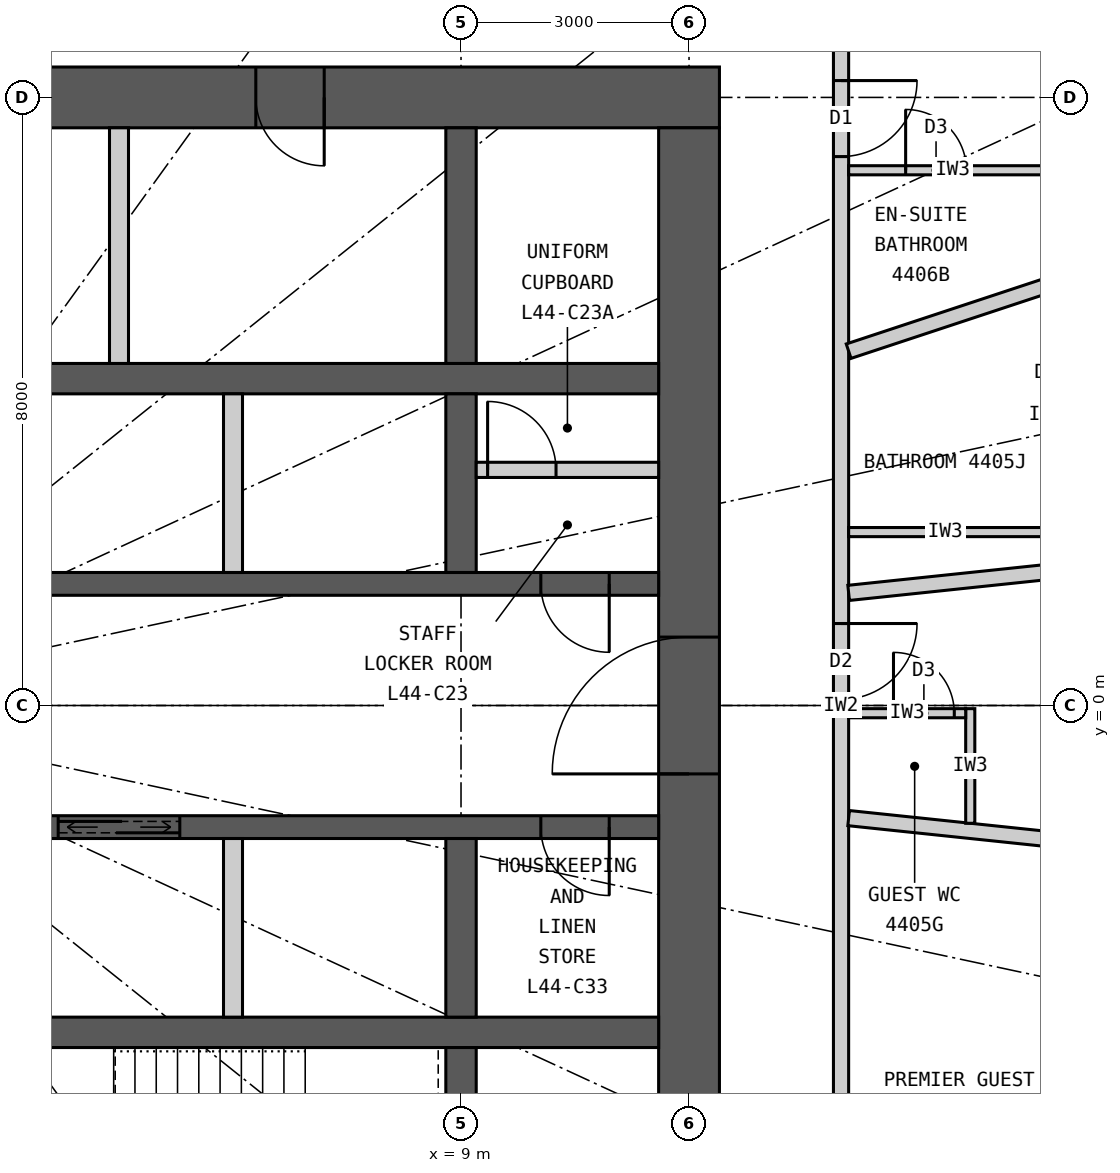
"""IFC4 building model, lengths in metres.
Left out: names, types, materials, properties, quantities, classifications, styles, units other than length and angle.
Written with IfcOpenShell. Run it as: python <this file> out.ifc"""

import sys

from ifc_helpers import new_model, si_unit, direction, frame, frame_2d, origin, place, context, subcontext, project, spatial, rectangle, extrude, element, fill, save


model = new_model("IFC4")
c1 = context("Model", 3, precision=1e-05, world=origin(), true_north=direction((0.0, 1.0)))
c2 = subcontext(c1, "Body", "Model", "MODEL_VIEW")
j1 = project(units=[si_unit("LENGTHUNIT", "METRE"), si_unit("PLANEANGLEUNIT", "RADIAN")], contexts=[c1])
p1 = place(None, origin())
s1 = spatial("IfcSite", under=j1, at=p1, CompositionType="ELEMENT")
p2 = place(p1, origin())
s2 = spatial("IfcBuilding", under=s1, at=p2, CompositionType="ELEMENT")
p3 = place(p2, frame((0.0, 0.0, 166.5)))
s3 = spatial("IfcBuildingStorey", under=s2, at=p3, CompositionType="ELEMENT", Elevation=166.5)
p4 = place(p3, frame((-12.4, 8.0, 0.0), z_axis=(0.0, 0.0, 1.0), x_axis=(1.0, 0.0, 0.0)))
e1 = element("IfcWall", 1, at=p4, inside=s3, PredefinedType="SHEAR", context=c2, shape_type="SweptSolid", body=[
    extrude(rectangle(XDim=24.8, YDim=0.8, at=frame_2d((12.4, 0.0))), origin(), (0.0, 0.0, 1.0), 3.3),
])
p5 = place(p4, frame((11.1, 0.0, 0.0)))
e2 = element("IfcOpeningElement", 2, at=p5, cuts=e1, PredefinedType="OPENING", context=c2, shape_type="SweptSolid", body=[
    extrude(rectangle(XDim=1.2, YDim=2.2, at=frame_2d((0.6, 1.1))), frame((0.0, 0.41, 0.0), z_axis=(0.0, -1.0, 0.0), x_axis=(1.0, 0.0, 0.0)), (0.0, 0.0, 1.0), 0.82),
])
p6 = place(p4, frame((18.7, 0.0, 0.0)))
e3 = element("IfcOpeningElement", 3, at=p6, cuts=e1, PredefinedType="OPENING", context=c2, shape_type="SweptSolid", body=[
    extrude(rectangle(XDim=0.9, YDim=2.2, at=frame_2d((0.45, 1.1))), frame((0.0, 0.41, 0.0), z_axis=(0.0, -1.0, 0.0), x_axis=(1.0, 0.0, 0.0)), (0.0, 0.0, 1.0), 0.82),
])
p7 = place(p3, frame((12.0, -7.6, 0.0), z_axis=(0.0, 0.0, 1.0), x_axis=(0.0, 1.0, 0.0)))
e4 = element("IfcWall", 4, at=p7, inside=s3, PredefinedType="SHEAR", context=c2, shape_type="SweptSolid", body=[
    extrude(rectangle(XDim=15.2, YDim=0.8, at=frame_2d((7.6, 0.0))), origin(), (0.0, 0.0, 1.0), 3.3),
])
p8 = place(p7, frame((6.7, 0.0, 0.0)))
e5 = element("IfcOpeningElement", 5, at=p8, cuts=e4, PredefinedType="OPENING", context=c2, shape_type="SweptSolid", body=[
    extrude(rectangle(XDim=1.8, YDim=2.2, at=frame_2d((0.9, 1.1))), frame((0.0, 0.41, 0.0), z_axis=(0.0, -1.0, 0.0), x_axis=(1.0, 0.0, 0.0)), (0.0, 0.0, 1.0), 0.82),
])
p9 = place(p3, frame((-11.6, 4.3, 0.0), z_axis=(0.0, 0.0, 1.0), x_axis=(1.0, 0.0, 0.0)))
e6 = element("IfcWall", 6, at=p9, inside=s3, PredefinedType="SHEAR", context=c2, shape_type="SweptSolid", body=[
    extrude(rectangle(XDim=23.2, YDim=0.4, at=frame_2d((11.6, 0.0))), origin(), (0.0, 0.0, 1.0), 3.3),
])
p10 = place(p3, frame((-11.6, 1.6, 0.0), z_axis=(0.0, 0.0, 1.0), x_axis=(1.0, 0.0, 0.0)))
e7 = element("IfcWall", 7, at=p10, inside=s3, PredefinedType="SHEAR", context=c2, shape_type="SweptSolid", body=[
    extrude(rectangle(XDim=23.2, YDim=0.3, at=frame_2d((11.6, 0.0))), origin(), (0.0, 0.0, 1.0), 3.3),
])
p11 = place(p10, frame((9.55, 0.0, 0.0)))
e8 = element("IfcOpeningElement", 8, at=p11, cuts=e7, PredefinedType="OPENING", context=c2, shape_type="SweptSolid", body=[
    extrude(rectangle(XDim=1.1, YDim=2.2, at=frame_2d((0.55, 1.1))), frame((0.0, 0.16, 0.0), z_axis=(0.0, -1.0, 0.0), x_axis=(1.0, 0.0, 0.0)), (0.0, 0.0, 1.0), 0.32),
])
p12 = place(p10, frame((12.55, 0.0, 0.0)))
e9 = element("IfcOpeningElement", 9, at=p12, cuts=e7, PredefinedType="OPENING", context=c2, shape_type="SweptSolid", body=[
    extrude(rectangle(XDim=1.1, YDim=2.2, at=frame_2d((0.55, 1.1))), frame((0.0, 0.16, 0.0), z_axis=(0.0, -1.0, 0.0), x_axis=(1.0, 0.0, 0.0)), (0.0, 0.0, 1.0), 0.32),
])
p13 = place(p10, frame((0.65, 0.0, 0.0)))
e10 = element("IfcOpeningElement", 10, at=p13, cuts=e7, PredefinedType="OPENING", context=c2, shape_type="SweptSolid", body=[
    extrude(rectangle(XDim=0.9, YDim=2.2, at=frame_2d((0.45, 1.1))), frame((0.0, 0.16, 0.0), z_axis=(0.0, -1.0, 0.0), x_axis=(1.0, 0.0, 0.0)), (0.0, 0.0, 1.0), 0.32),
])
p14 = place(p10, frame((5.15, 0.0, 0.0)))
e11 = element("IfcOpeningElement", 11, at=p14, cuts=e7, PredefinedType="OPENING", context=c2, shape_type="SweptSolid", body=[
    extrude(rectangle(XDim=0.9, YDim=2.2, at=frame_2d((0.45, 1.1))), frame((0.0, 0.16, 0.0), z_axis=(0.0, -1.0, 0.0), x_axis=(1.0, 0.0, 0.0)), (0.0, 0.0, 1.0), 0.32),
])
p15 = place(p10, frame((21.65, 0.0, 0.0)))
e12 = element("IfcOpeningElement", 12, at=p15, cuts=e7, PredefinedType="OPENING", context=c2, shape_type="SweptSolid", body=[
    extrude(rectangle(XDim=0.9, YDim=2.2, at=frame_2d((0.45, 1.1))), frame((0.0, 0.16, 0.0), z_axis=(0.0, -1.0, 0.0), x_axis=(1.0, 0.0, 0.0)), (0.0, 0.0, 1.0), 0.32),
])
p16 = place(p3, frame((-11.6, -4.3, 0.0), z_axis=(0.0, 0.0, 1.0), x_axis=(1.0, 0.0, 0.0)))
e13 = element("IfcWall", 13, at=p16, inside=s3, PredefinedType="SHEAR", context=c2, shape_type="SweptSolid", body=[
    extrude(rectangle(XDim=23.2, YDim=0.4, at=frame_2d((11.6, 0.0))), origin(), (0.0, 0.0, 1.0), 3.3),
])
p17 = place(p3, frame((-11.6, -1.6, 0.0), z_axis=(0.0, 0.0, 1.0), x_axis=(1.0, 0.0, 0.0)))
e14 = element("IfcWall", 14, at=p17, inside=s3, PredefinedType="SHEAR", context=c2, shape_type="SweptSolid", body=[
    extrude(rectangle(XDim=23.2, YDim=0.3, at=frame_2d((11.6, 0.0))), origin(), (0.0, 0.0, 1.0), 3.3),
])
p18 = place(p17, frame((9.55, 0.0, 0.0)))
e15 = element("IfcOpeningElement", 15, at=p18, cuts=e14, PredefinedType="OPENING", context=c2, shape_type="SweptSolid", body=[
    extrude(rectangle(XDim=1.1, YDim=2.2, at=frame_2d((0.55, 1.1))), frame((0.0, 0.16, 0.0), z_axis=(0.0, -1.0, 0.0), x_axis=(1.0, 0.0, 0.0)), (0.0, 0.0, 1.0), 0.32),
])
p19 = place(p17, frame((15.3, 0.0, 0.0)))
e16 = element("IfcOpeningElement", 16, at=p19, cuts=e14, PredefinedType="OPENING", context=c2, shape_type="SweptSolid", body=[
    extrude(rectangle(XDim=1.6, YDim=2.4, at=frame_2d((0.8, 1.2))), frame((0.0, 0.16, 0.0), z_axis=(0.0, -1.0, 0.0), x_axis=(1.0, 0.0, 0.0)), (0.0, 0.0, 1.0), 0.32),
])
p20 = place(p17, frame((0.65, 0.0, 0.0)))
e17 = element("IfcOpeningElement", 17, at=p20, cuts=e14, PredefinedType="OPENING", context=c2, shape_type="SweptSolid", body=[
    extrude(rectangle(XDim=0.9, YDim=2.2, at=frame_2d((0.45, 1.1))), frame((0.0, 0.16, 0.0), z_axis=(0.0, -1.0, 0.0), x_axis=(1.0, 0.0, 0.0)), (0.0, 0.0, 1.0), 0.32),
])
p21 = place(p17, frame((5.15, 0.0, 0.0)))
e18 = element("IfcOpeningElement", 18, at=p21, cuts=e14, PredefinedType="OPENING", context=c2, shape_type="SweptSolid", body=[
    extrude(rectangle(XDim=0.9, YDim=2.2, at=frame_2d((0.45, 1.1))), frame((0.0, 0.16, 0.0), z_axis=(0.0, -1.0, 0.0), x_axis=(1.0, 0.0, 0.0)), (0.0, 0.0, 1.0), 0.32),
])
p22 = place(p17, frame((21.65, 0.0, 0.0)))
e19 = element("IfcOpeningElement", 19, at=p22, cuts=e14, PredefinedType="OPENING", context=c2, shape_type="SweptSolid", body=[
    extrude(rectangle(XDim=0.9, YDim=2.2, at=frame_2d((0.45, 1.1))), frame((0.0, 0.16, 0.0), z_axis=(0.0, -1.0, 0.0), x_axis=(1.0, 0.0, 0.0)), (0.0, 0.0, 1.0), 0.32),
])
p23 = place(p3, frame((9.0, 4.5, 0.0), z_axis=(0.0, 0.0, 1.0), x_axis=(0.0, 1.0, 0.0)))
e20 = element("IfcWall", 20, at=p23, inside=s3, PredefinedType="SHEAR", context=c2, shape_type="SweptSolid", body=[
    extrude(rectangle(XDim=3.1, YDim=0.4, at=frame_2d((1.55, 0.0))), origin(), (0.0, 0.0, 1.0), 3.3),
])
for number, where, z_axis, x_axis in (
    (21, (9.0, 1.75, 0.0), (0.0, 0.0, 1.0), (0.0, 1.0, 0.0)),
    (22, (9.0, -4.1, 0.0), (0.0, 0.0, 1.0), (0.0, 1.0, 0.0)),
):
    element("IfcWall", number, at=place(p3, frame(where, z_axis=z_axis, x_axis=x_axis)), inside=s3, PredefinedType="SHEAR", context=c2, shape_type="SweptSolid", body=[
        extrude(rectangle(XDim=2.35, YDim=0.4, at=frame_2d((1.175, 0.0))), origin(), (0.0, 0.0, 1.0), 3.3),
    ])
p24 = place(p3, frame((9.0, -7.6, 0.0), z_axis=(0.0, 0.0, 1.0), x_axis=(0.0, 1.0, 0.0)))
e23 = element("IfcWall", 23, at=p24, inside=s3, PredefinedType="SHEAR", context=c2, shape_type="SweptSolid", body=[
    extrude(rectangle(XDim=3.1, YDim=0.4, at=frame_2d((1.55, 0.0))), origin(), (0.0, 0.0, 1.0), 3.3),
])
p25 = place(p3, frame((4.5, 4.5, 0.0), z_axis=(0.0, 0.0, 1.0), x_axis=(0.0, 1.0, 0.0)))
e24 = element("IfcWall", 24, at=p25, inside=s3, PredefinedType="PARTITIONING", context=c2, shape_type="SweptSolid", body=[
    extrude(rectangle(XDim=3.1, YDim=0.25, at=frame_2d((1.55, 0.0))), origin(), (0.0, 0.0, 1.0), 3.3),
])
for number, where, z_axis, x_axis in (
    (25, (6.0, 1.75, 0.0), (0.0, 0.0, 1.0), (0.0, 1.0, 0.0)),
    (26, (6.0, -4.1, 0.0), (0.0, 0.0, 1.0), (0.0, 1.0, 0.0)),
):
    element("IfcWall", number, at=place(p3, frame(where, z_axis=z_axis, x_axis=x_axis)), inside=s3, PredefinedType="PARTITIONING", context=c2, shape_type="SweptSolid", body=[
        extrude(rectangle(XDim=2.35, YDim=0.25, at=frame_2d((1.175, 0.0))), origin(), (0.0, 0.0, 1.0), 3.3),
    ])
p26 = place(p3, frame((14.0, -9.9, 0.0), z_axis=(0.0, 0.0, 1.0), x_axis=(0.0, 1.0, 0.0)))
e27 = element("IfcWall", 27, at=p26, inside=s3, PredefinedType="PARTITIONING", context=c2, shape_type="SweptSolid", body=[
    extrude(rectangle(XDim=19.8, YDim=0.2, at=frame_2d((9.9, 0.0))), origin(), (0.0, 0.0, 1.0), 3.12),
])
p27 = place(p26, frame((3.688, 0.0, 0.0)))
e28 = element("IfcOpeningElement", 28, at=p27, cuts=e27, PredefinedType="OPENING", context=c2, shape_type="SweptSolid", body=[
    extrude(rectangle(XDim=1.0, YDim=2.2, at=frame_2d((0.5, 1.1))), frame((0.0, 0.11, 0.0), z_axis=(0.0, -1.0, 0.0), x_axis=(1.0, 0.0, 0.0)), (0.0, 0.0, 1.0), 0.22),
])
p28 = place(p26, frame((9.979, 0.0, 0.0)))
e29 = element("IfcOpeningElement", 29, at=p28, cuts=e27, PredefinedType="OPENING", context=c2, shape_type="SweptSolid", body=[
    extrude(rectangle(XDim=1.0, YDim=2.2, at=frame_2d((0.5, 1.1))), frame((0.0, 0.11, 0.0), z_axis=(0.0, -1.0, 0.0), x_axis=(1.0, 0.0, 0.0)), (0.0, 0.0, 1.0), 0.22),
])
p29 = place(p26, frame((17.122, 0.0, 0.0)))
e30 = element("IfcOpeningElement", 30, at=p29, cuts=e27, PredefinedType="OPENING", context=c2, shape_type="SweptSolid", body=[
    extrude(rectangle(XDim=1.0, YDim=2.2, at=frame_2d((0.5, 1.1))), frame((0.0, 0.11, 0.0), z_axis=(0.0, -1.0, 0.0), x_axis=(1.0, 0.0, 0.0)), (0.0, 0.0, 1.0), 0.22),
])
p30 = place(p3, frame((14.1, 1.481, 0.0), z_axis=(0.0, 0.0, 1.0), x_axis=(0.994524794819, 0.104500873159, 0.0)))
e31 = element("IfcWall", 31, at=p30, inside=s3, PredefinedType="PARTITIONING", context=c2, shape_type="SweptSolid", body=[
    extrude(rectangle(XDim=8.362, YDim=0.2, at=frame_2d((4.181, 0.0))), origin(), (0.0, 0.0, 1.0), 2.47),
])
p31 = place(p30, frame((2.77, 0.0, 0.0)))
e32 = element("IfcOpeningElement", 32, at=p31, cuts=e31, PredefinedType="OPENING", context=c2, shape_type="SweptSolid", body=[
    extrude(rectangle(XDim=0.9, YDim=2.1, at=frame_2d((0.45, 1.05))), frame((0.0, 0.11, 0.0), z_axis=(0.0, -1.0, 0.0), x_axis=(1.0, 0.0, 0.0)), (0.0, 0.0, 1.0), 0.22),
])
p32 = place(p3, frame((14.1, 4.661, 0.0), z_axis=(0.0, 0.0, 1.0), x_axis=(0.949453216399, 0.313908569285, 0.0)))
e33 = element("IfcWall", 33, at=p32, inside=s3, PredefinedType="PARTITIONING", context=c2, shape_type="SweptSolid", body=[
    extrude(rectangle(XDim=7.109, YDim=0.2, at=frame_2d((3.554, 0.0))), origin(), (0.0, 0.0, 1.0), 3.12),
])
p33 = place(p3, frame((14.1, -1.481, 0.0), z_axis=(0.0, 0.0, 1.0), x_axis=(0.994524794819, -0.104500873159, 0.0)))
e34 = element("IfcWall", 34, at=p33, inside=s3, PredefinedType="PARTITIONING", context=c2, shape_type="SweptSolid", body=[
    extrude(rectangle(XDim=8.362, YDim=0.2, at=frame_2d((4.181, 0.0))), origin(), (0.0, 0.0, 1.0), 2.47),
])
p34 = place(p3, frame((15.7, -1.55, 0.0), z_axis=(0.0, 0.0, 1.0), x_axis=(0.0, 1.0, 0.0)))
e35 = element("IfcWall", 35, at=p34, inside=s3, PredefinedType="PARTITIONING", context=c2, shape_type="SweptSolid", body=[
    extrude(rectangle(XDim=1.508, YDim=0.12, at=frame_2d((0.754, 0.0))), origin(), (0.0, 0.0, 1.0), 3.12),
])
p35 = place(p3, frame((14.1, -0.102, 0.0), z_axis=(0.0, 0.0, 1.0), x_axis=(1.0, 0.0, 0.0)))
e36 = element("IfcWall", 36, at=p35, inside=s3, PredefinedType="PARTITIONING", context=c2, shape_type="SweptSolid", body=[
    extrude(rectangle(XDim=1.54, YDim=0.12, at=frame_2d((0.77, 0.0))), origin(), (0.0, 0.0, 1.0), 2.42),
])
p36 = place(p35, frame((0.59, 0.0, 0.0)))
e37 = element("IfcOpeningElement", 37, at=p36, cuts=e36, PredefinedType="OPENING", context=c2, shape_type="SweptSolid", body=[
    extrude(rectangle(XDim=0.8, YDim=2.1, at=frame_2d((0.4, 1.05))), frame((0.0, 0.07, 0.0), z_axis=(0.0, -1.0, 0.0), x_axis=(1.0, 0.0, 0.0)), (0.0, 0.0, 1.0), 0.14),
])
p37 = place(p3, frame((14.1, 2.281, 0.0), z_axis=(0.0, 0.0, 1.0), x_axis=(1.0, 0.0, 0.0)))
e38 = element("IfcWall", 38, at=p37, inside=s3, PredefinedType="PARTITIONING", context=c2, shape_type="SweptSolid", body=[
    extrude(rectangle(XDim=2.54, YDim=0.12, at=frame_2d((1.27, 0.0))), origin(), (0.0, 0.0, 1.0), 3.12),
])
p38 = place(p3, frame((14.1, 7.042, 0.0), z_axis=(0.0, 0.0, 1.0), x_axis=(1.0, 0.0, 0.0)))
e39 = element("IfcWall", 39, at=p38, inside=s3, PredefinedType="PARTITIONING", context=c2, shape_type="SweptSolid", body=[
    extrude(rectangle(XDim=2.74, YDim=0.12, at=frame_2d((1.37, 0.0))), origin(), (0.0, 0.0, 1.0), 3.12),
])
p39 = place(p38, frame((0.75, 0.0, 0.0)))
e40 = element("IfcOpeningElement", 40, at=p39, cuts=e39, PredefinedType="OPENING", context=c2, shape_type="SweptSolid", body=[
    extrude(rectangle(XDim=0.8, YDim=2.1, at=frame_2d((0.4, 1.05))), frame((0.0, 0.07, 0.0), z_axis=(0.0, -1.0, 0.0), x_axis=(1.0, 0.0, 0.0)), (0.0, 0.0, 1.0), 0.14),
])
p40 = place(p3, frame((9.2, 3.1, 0.0), z_axis=(0.0, 0.0, 1.0), x_axis=(1.0, 0.0, 0.0)))
e41 = element("IfcWall", 41, at=p40, inside=s3, PredefinedType="PARTITIONING", context=c2, shape_type="SweptSolid", body=[
    extrude(rectangle(XDim=2.4, YDim=0.2, at=frame_2d((1.2, 0.0))), origin(), (0.0, 0.0, 1.0), 3.12),
])
p41 = place(p40, frame((0.15, 0.0, 0.0)))
e42 = element("IfcOpeningElement", 42, at=p41, cuts=e41, PredefinedType="OPENING", context=c2, shape_type="SweptSolid", body=[
    extrude(rectangle(XDim=0.9, YDim=2.2, at=frame_2d((0.45, 1.1))), frame((0.0, 0.11, 0.0), z_axis=(0.0, -1.0, 0.0), x_axis=(1.0, 0.0, 0.0)), (0.0, 0.0, 1.0), 0.22),
])
p42 = place(p36, origin())
e43 = element("IfcDoor", 43, at=p42, inside=s3, OperationType="SINGLE_SWING_LEFT", PredefinedType="DOOR", context=c2, shape_type="SweptSolid", body=[
    extrude(rectangle(XDim=0.8, YDim=2.1, at=frame_2d((0.4, 1.05))), frame((0.0, 0.025, 0.0), z_axis=(0.0, -1.0, 0.0), x_axis=(1.0, 0.0, 0.0)), (0.0, 0.0, 1.0), 0.05),
])
fill(e37, e43)
p43 = place(p28, origin())
e44 = element("IfcDoor", 44, at=p43, inside=s3, OperationType="SINGLE_SWING_RIGHT", PredefinedType="DOOR", context=c2, shape_type="SweptSolid", body=[
    extrude(rectangle(XDim=1.0, YDim=2.2, at=frame_2d((0.5, 1.1))), frame((0.0, 0.025, 0.0), z_axis=(0.0, -1.0, 0.0), x_axis=(1.0, 0.0, 0.0)), (0.0, 0.0, 1.0), 0.05),
])
fill(e29, e44)
p44 = place(p39, origin())
e45 = element("IfcDoor", 45, at=p44, inside=s3, OperationType="SINGLE_SWING_LEFT", PredefinedType="DOOR", context=c2, shape_type="SweptSolid", body=[
    extrude(rectangle(XDim=0.8, YDim=2.1, at=frame_2d((0.4, 1.05))), frame((0.0, 0.025, 0.0), z_axis=(0.0, -1.0, 0.0), x_axis=(1.0, 0.0, 0.0)), (0.0, 0.0, 1.0), 0.05),
])
fill(e40, e45)
p45 = place(p29, origin())
e46 = element("IfcDoor", 46, at=p45, inside=s3, OperationType="SINGLE_SWING_RIGHT", PredefinedType="DOOR", context=c2, shape_type="SweptSolid", body=[
    extrude(rectangle(XDim=1.0, YDim=2.2, at=frame_2d((0.5, 1.1))), frame((0.0, 0.025, 0.0), z_axis=(0.0, -1.0, 0.0), x_axis=(1.0, 0.0, 0.0)), (0.0, 0.0, 1.0), 0.05),
])
fill(e30, e46)
p46 = place(p6, origin())
e47 = element("IfcDoor", 47, at=p46, inside=s3, OperationType="SINGLE_SWING_RIGHT", PredefinedType="DOOR", context=c2, shape_type="SweptSolid", body=[
    extrude(rectangle(XDim=0.9, YDim=2.2, at=frame_2d((0.45, 1.1))), frame((0.0, 0.025, 0.0), z_axis=(0.0, -1.0, 0.0), x_axis=(1.0, 0.0, 0.0)), (0.0, 0.0, 1.0), 0.05),
])
fill(e3, e47)
p47 = place(p19, origin())
e48 = element("IfcDoor", 48, at=p47, inside=s3, OperationType="DOUBLE_DOOR_SLIDING", PredefinedType="DOOR", context=c2, shape_type="SweptSolid", body=[
    extrude(rectangle(XDim=1.6, YDim=2.4, at=frame_2d((0.8, 1.2))), frame((0.0, 0.025, 0.0), z_axis=(0.0, -1.0, 0.0), x_axis=(1.0, 0.0, 0.0)), (0.0, 0.0, 1.0), 0.05),
])
fill(e16, e48)
p48 = place(p22, origin())
e49 = element("IfcDoor", 49, at=p48, inside=s3, OperationType="SINGLE_SWING_RIGHT", PredefinedType="DOOR", context=c2, shape_type="SweptSolid", body=[
    extrude(rectangle(XDim=0.9, YDim=2.2, at=frame_2d((0.45, 1.1))), frame((0.0, 0.025, 0.0), z_axis=(0.0, -1.0, 0.0), x_axis=(1.0, 0.0, 0.0)), (0.0, 0.0, 1.0), 0.05),
])
fill(e19, e49)
p49 = place(p15, origin())
e50 = element("IfcDoor", 50, at=p49, inside=s3, OperationType="SINGLE_SWING_RIGHT", PredefinedType="DOOR", context=c2, shape_type="SweptSolid", body=[
    extrude(rectangle(XDim=0.9, YDim=2.2, at=frame_2d((0.45, 1.1))), frame((0.0, 0.025, 0.0), z_axis=(0.0, -1.0, 0.0), x_axis=(1.0, 0.0, 0.0)), (0.0, 0.0, 1.0), 0.05),
])
fill(e12, e50)
p50 = place(p41, origin())
e51 = element("IfcDoor", 51, at=p50, inside=s3, OperationType="SINGLE_SWING_LEFT", PredefinedType="DOOR", context=c2, shape_type="SweptSolid", body=[
    extrude(rectangle(XDim=0.9, YDim=2.2, at=frame_2d((0.45, 1.1))), frame((0.0, 0.025, 0.0), z_axis=(0.0, -1.0, 0.0), x_axis=(1.0, 0.0, 0.0)), (0.0, 0.0, 1.0), 0.05),
])
fill(e42, e51)
p51 = place(p8, origin())
e52 = element("IfcDoor", 52, at=p51, inside=s3, OperationType="DOUBLE_DOOR_DOUBLE_SWING", PredefinedType="DOOR", context=c2, shape_type="SweptSolid", body=[
    extrude(rectangle(XDim=1.8, YDim=2.2, at=frame_2d((0.9, 1.1))), frame((0.0, 0.025, 0.0), z_axis=(0.0, -1.0, 0.0), x_axis=(1.0, 0.0, 0.0)), (0.0, 0.0, 1.0), 0.05),
])
fill(e5, e52)
save(model, sys.argv[1])
